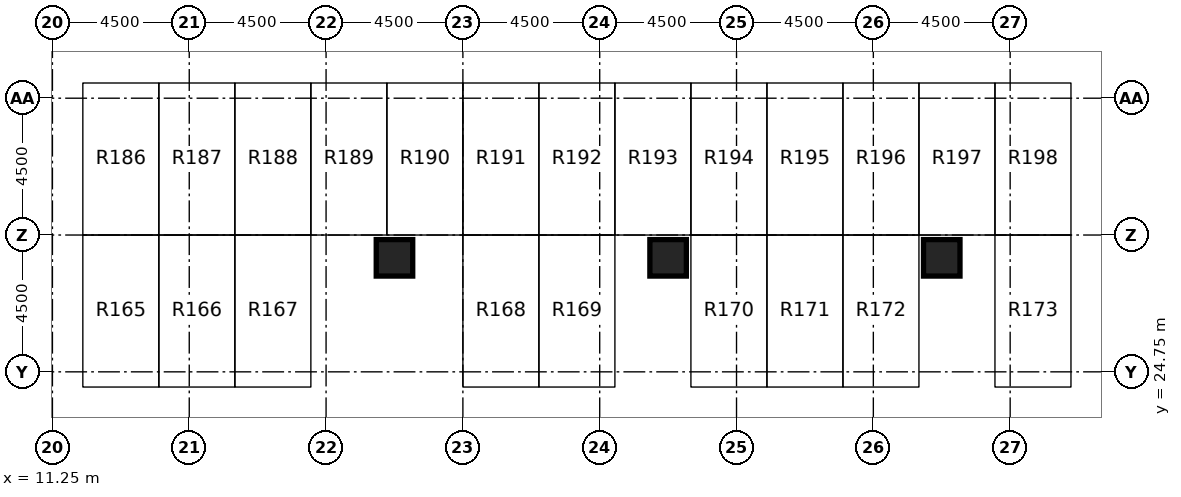
"""IFC4 building model, lengths in metres.
Left out: names, types, materials, properties, quantities, classifications, styles, units other than length and angle.
Written with IfcOpenShell. Run it as: python <this file> out.ifc"""

import sys

from ifc_helpers import new_model, si_unit, direction, frame, origin, origin_2d, place, context, subcontext, project, spatial, rectangle, extrude, element, save


model = new_model("IFC4")
c1 = context("Model", 3, precision=1e-05, world=origin(), true_north=direction((0.0, 1.0)))
c2 = subcontext(c1, "Body", "Model", "MODEL_VIEW")
j1 = project(units=[si_unit("LENGTHUNIT", "METRE"), si_unit("PLANEANGLEUNIT", "RADIAN")], contexts=[c1])
p1 = place(None, origin())
s1 = spatial("IfcSite", under=j1, at=p1, CompositionType="ELEMENT")
p2 = place(p1, origin())
s2 = spatial("IfcBuilding", under=s1, at=p2, CompositionType="ELEMENT")
p3 = place(p2, frame((0.0, 0.0, -4.0)))
s3 = spatial("IfcBuildingStorey", under=s2, at=p3, CompositionType="ELEMENT", Elevation=-4.0)
for number, where, z_axis, x_axis in (
    (1, (22.5, 28.5, 0.0), (0.0, 0.0, 1.0), (1.0, 0.0, 0.0)),
    (2, (31.5, 28.5, 0.0), (0.0, 0.0, 1.0), (1.0, 0.0, 0.0)),
    (3, (40.5, 28.5, 0.0), (0.0, 0.0, 1.0), (1.0, 0.0, 0.0)),
):
    element("IfcColumn", number, at=place(p3, frame(where, z_axis=z_axis, x_axis=x_axis)), inside=s3, PredefinedType="COLUMN", context=c2, shape_type="SweptSolid", body=[
        extrude(rectangle(XDim=1.2, YDim=1.2, at=origin_2d()), origin(), (0.0, 0.0, 1.0), 3.1),
    ])
save(model, sys.argv[1])
